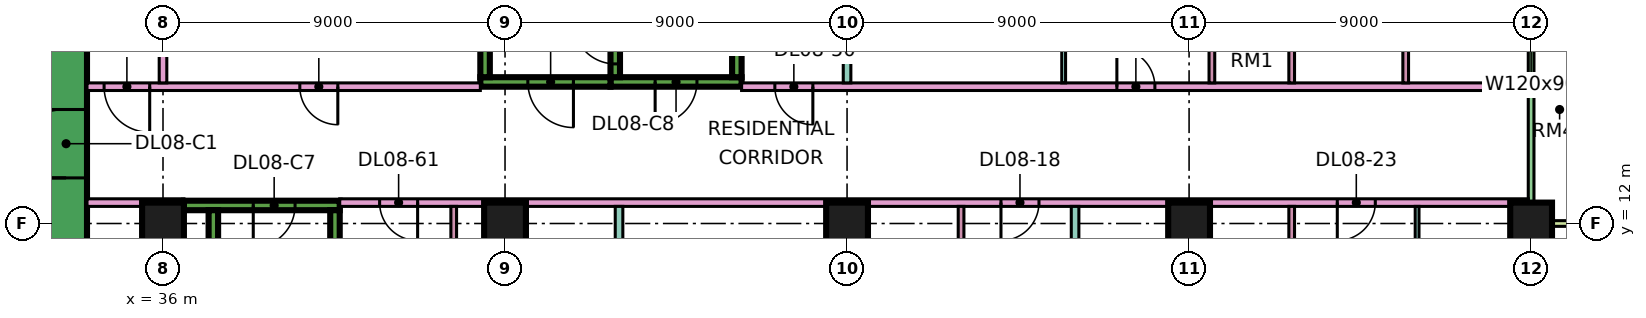
"""IFC4 building model, lengths in metres.
Left out: names, types, materials, properties, quantities, classifications, styles, units other than length and angle.
Written with IfcOpenShell. Run it as: python <this file> out.ifc"""

import sys

from ifc_helpers import new_model, si_unit, direction, frame, frame_2d, origin, origin_2d, place, context, subcontext, project, spatial, rectangle, extrude, element, fill, save


model = new_model("IFC4")
c1 = context("Model", 3, precision=1e-05, world=origin(), true_north=direction((0.0, 1.0)))
c2 = subcontext(c1, "Body", "Model", "MODEL_VIEW")
j1 = project(units=[si_unit("LENGTHUNIT", "METRE"), si_unit("PLANEANGLEUNIT", "RADIAN")], contexts=[c1])
p1 = place(None, origin())
s1 = spatial("IfcSite", under=j1, at=p1, CompositionType="ELEMENT")
p2 = place(p1, origin())
s2 = spatial("IfcBuilding", under=s1, at=p2, CompositionType="ELEMENT")
p3 = place(p2, frame((0.0, 0.0, 45.15)))
s3 = spatial("IfcBuildingStorey", under=s2, at=p3, CompositionType="ELEMENT", Elevation=45.15)
for number, where, z_axis, x_axis in (
    (1, (36.0, 12.0, 0.0), (0.0, 0.0, 1.0), (1.0, 0.0, 0.0)),
    (2, (45.0, 12.0, 0.0), (0.0, 0.0, 1.0), (1.0, 0.0, 0.0)),
    (3, (54.0, 12.0, 0.0), (0.0, 0.0, 1.0), (1.0, 0.0, 0.0)),
    (4, (63.0, 12.0, 0.0), (0.0, 0.0, 1.0), (1.0, 0.0, 0.0)),
    (5, (72.0, 12.0, 0.0), (0.0, 0.0, 1.0), (1.0, 0.0, 0.0)),
):
    element("IfcColumn", number, at=place(p3, frame(where, z_axis=z_axis, x_axis=x_axis)), inside=s3, PredefinedType="COLUMN", context=c2, shape_type="SweptSolid", body=[
        extrude(rectangle(XDim=1.1, YDim=1.1, at=origin_2d()), origin(), (0.0, 0.0, 1.0), 3.75),
    ])
p4 = place(p3, frame((33.45, 8.1, 0.0), z_axis=(0.0, 0.0, 1.0), x_axis=(0.0, 1.0, 0.0)))
e6 = element("IfcWall", 6, at=p4, inside=s3, PredefinedType="SHEAR", context=c2, shape_type="SweptSolid", body=[
    extrude(rectangle(XDim=10.8, YDim=1.1, at=frame_2d((5.4, 0.0))), origin(), (0.0, 0.0, 1.0), 3.75),
])
p5 = place(p4, frame((5.1, 0.0, 0.0)))
e7 = element("IfcOpeningElement", 7, at=p5, cuts=e6, PredefinedType="OPENING", context=c2, shape_type="SweptSolid", body=[
    extrude(rectangle(XDim=1.8, YDim=2.4, at=frame_2d((0.9, 1.2))), frame((0.0, 0.56, 0.0), z_axis=(0.0, -1.0, 0.0), x_axis=(1.0, 0.0, 0.0)), (0.0, 0.0, 1.0), 1.12),
])
p6 = place(p3, frame((36.55, 12.475, 0.0), z_axis=(0.0, 0.0, 1.0), x_axis=(1.0, 0.0, 0.0)))
e8 = element("IfcWall", 8, at=p6, inside=s3, PredefinedType="SHEAR", context=c2, shape_type="SweptSolid", body=[
    extrude(rectangle(XDim=4.1, YDim=0.25, at=frame_2d((2.05, 0.0))), origin(), (0.0, 0.0, 1.0), 3.75),
])
p7 = place(p6, frame((1.825, 0.0, 0.0)))
e9 = element("IfcOpeningElement", 9, at=p7, cuts=e8, PredefinedType="OPENING", context=c2, shape_type="SweptSolid", body=[
    extrude(rectangle(XDim=1.1, YDim=2.2, at=frame_2d((0.55, 1.1))), frame((0.0, 0.135, 0.0), z_axis=(0.0, -1.0, 0.0), x_axis=(1.0, 0.0, 0.0)), (0.0, 0.0, 1.0), 0.27),
])
for number, where, z_axis, x_axis in (
    (10, (37.325, 5.85, 0.0), (0.0, 0.0, 1.0), (0.0, 1.0, 0.0)),
    (11, (40.525, 5.85, 0.0), (0.0, 0.0, 1.0), (0.0, 1.0, 0.0)),
):
    element("IfcWall", number, at=place(p3, frame(where, z_axis=z_axis, x_axis=x_axis)), inside=s3, PredefinedType="SHEAR", context=c2, shape_type="SweptSolid", body=[
        extrude(rectangle(XDim=6.5, YDim=0.25, at=frame_2d((3.25, 0.0))), origin(), (0.0, 0.0, 1.0), 3.75),
    ])
p8 = place(p3, frame((47.775, 15.725, 0.0), z_axis=(0.0, 0.0, 1.0), x_axis=(1.0, 0.0, 0.0)))
e12 = element("IfcWall", 12, at=p8, inside=s3, PredefinedType="SHEAR", context=c2, shape_type="SweptSolid", body=[
    extrude(rectangle(XDim=3.45, YDim=0.25, at=frame_2d((1.725, 0.0))), origin(), (0.0, 0.0, 1.0), 3.75),
])
p9 = place(p8, frame((1.175, 0.0, 0.0)))
e13 = element("IfcOpeningElement", 13, at=p9, cuts=e12, PredefinedType="OPENING", context=c2, shape_type="SweptSolid", body=[
    extrude(rectangle(XDim=1.1, YDim=2.2, at=frame_2d((0.55, 1.1))), frame((0.0, 0.135, 0.0), z_axis=(0.0, -1.0, 0.0), x_axis=(1.0, 0.0, 0.0)), (0.0, 0.0, 1.0), 0.27),
])
p10 = place(p3, frame((47.9, 15.85, 0.0), z_axis=(0.0, 0.0, 1.0), x_axis=(0.0, 1.0, 0.0)))
e14 = element("IfcWall", 14, at=p10, inside=s3, PredefinedType="SHEAR", context=c2, shape_type="SweptSolid", body=[
    extrude(rectangle(XDim=6.5, YDim=0.25, at=frame_2d((3.25, 0.0))), origin(), (0.0, 0.0, 1.0), 3.75),
])
p11 = place(p10, frame((0.35, 0.0, 0.0)))
e15 = element("IfcOpeningElement", 15, at=p11, cuts=e14, PredefinedType="OPENING", context=c2, shape_type="SweptSolid", body=[
    extrude(rectangle(XDim=1.1, YDim=2.2, at=frame_2d((0.55, 1.1))), frame((0.0, 0.135, 0.0), z_axis=(0.0, -1.0, 0.0), x_axis=(1.0, 0.0, 0.0)), (0.0, 0.0, 1.0), 0.27),
])
p12 = place(p3, frame((51.1, 15.85, 0.0), z_axis=(0.0, 0.0, 1.0), x_axis=(0.0, 1.0, 0.0)))
e16 = element("IfcWall", 16, at=p12, inside=s3, PredefinedType="SHEAR", context=c2, shape_type="SweptSolid", body=[
    extrude(rectangle(XDim=6.5, YDim=0.25, at=frame_2d((3.25, 0.0))), origin(), (0.0, 0.0, 1.0), 3.75),
])
p13 = place(p3, frame((44.35, 15.725, 0.0), z_axis=(0.0, 0.0, 1.0), x_axis=(1.0, 0.0, 0.0)))
e17 = element("IfcWall", 17, at=p13, inside=s3, PredefinedType="SHEAR", context=c2, shape_type="SweptSolid", body=[
    extrude(rectangle(XDim=3.425, YDim=0.25, at=frame_2d((1.712, 0.0))), origin(), (0.0, 0.0, 1.0), 3.75),
])
p14 = place(p13, frame((1.25, 0.0, 0.0)))
e18 = element("IfcOpeningElement", 18, at=p14, cuts=e17, PredefinedType="OPENING", context=c2, shape_type="SweptSolid", body=[
    extrude(rectangle(XDim=1.2, YDim=2.2, at=frame_2d((0.6, 1.1))), frame((0.0, 0.135, 0.0), z_axis=(0.0, -1.0, 0.0), x_axis=(1.0, 0.0, 0.0)), (0.0, 0.0, 1.0), 0.27),
])
p15 = place(p3, frame((44.475, 15.85, 0.0), z_axis=(0.0, 0.0, 1.0), x_axis=(0.0, 1.0, 0.0)))
e19 = element("IfcWall", 19, at=p15, inside=s3, PredefinedType="SHEAR", context=c2, shape_type="SweptSolid", body=[
    extrude(rectangle(XDim=6.5, YDim=0.25, at=frame_2d((3.25, 0.0))), origin(), (0.0, 0.0, 1.0), 3.75),
])
p16 = place(p15, frame((1.75, 0.0, 0.0)))
e20 = element("IfcOpeningElement", 20, at=p16, cuts=e19, PredefinedType="OPENING", context=c2, shape_type="SweptSolid", body=[
    extrude(rectangle(XDim=1.1, YDim=2.2, at=frame_2d((0.55, 1.1))), frame((0.0, 0.135, 0.0), z_axis=(0.0, -1.0, 0.0), x_axis=(1.0, 0.0, 0.0)), (0.0, 0.0, 1.0), 0.27),
])
p17 = place(p15, frame((4.3, 0.0, 0.0)))
e21 = element("IfcOpeningElement", 21, at=p17, cuts=e19, PredefinedType="OPENING", context=c2, shape_type="SweptSolid", body=[
    extrude(rectangle(XDim=1.1, YDim=2.2, at=frame_2d((0.55, 1.1))), frame((0.0, 0.135, 0.0), z_axis=(0.0, -1.0, 0.0), x_axis=(1.0, 0.0, 0.0)), (0.0, 0.0, 1.0), 0.27),
])
p18 = place(p3, frame((72.0, 12.075, 0.0), z_axis=(0.0, 0.0, 1.0), x_axis=(0.0, 1.0, 0.0)))
e22 = element("IfcWall", 22, at=p18, inside=s3, PredefinedType="SOLIDWALL", context=c2, shape_type="SweptSolid", body=[
    extrude(rectangle(XDim=10.35, YDim=0.15, at=frame_2d((5.175, 0.0))), origin(), (0.0, 0.0, 1.0), 3.35),
])
p19 = place(p18, frame((4.575, 0.0, 1.7)))
e23 = element("IfcOpeningElement", 23, at=p19, cuts=e22, PredefinedType="OPENING", context=c2, shape_type="SweptSolid", body=[
    extrude(rectangle(XDim=1.2, YDim=0.9, at=frame_2d((0.6, 0.45))), frame((0.0, 0.085, 0.0), z_axis=(0.0, -1.0, 0.0), x_axis=(1.0, 0.0, 0.0)), (0.0, 0.0, 1.0), 0.17),
])
p20 = place(p18, frame((8.587, 0.0, 0.45)))
e24 = element("IfcOpeningElement", 24, at=p20, cuts=e22, PredefinedType="OPENING", context=c2, shape_type="SweptSolid", body=[
    extrude(rectangle(XDim=1.2, YDim=2.4, at=frame_2d((0.6, 1.2))), frame((0.0, 0.085, 0.0), z_axis=(0.0, -1.0, 0.0), x_axis=(1.0, 0.0, 0.0)), (0.0, 0.0, 1.0), 0.17),
])
p21 = place(p3, frame((73.5, 12.0, 0.0), z_axis=(0.0, 0.0, 1.0), x_axis=(-1.0, 0.0, 0.0)))
e25 = element("IfcWall", 25, at=p21, inside=s3, PredefinedType="SOLIDWALL", context=c2, shape_type="SweptSolid", body=[
    extrude(rectangle(XDim=1.5, YDim=0.15, at=frame_2d((0.75, 0.0))), origin(), (0.0, 0.0, 1.0), 3.35),
])
p22 = place(p3, frame((34.0, 12.55, 0.0), z_axis=(0.0, 0.0, 1.0), x_axis=(1.0, 0.0, 0.0)))
e26 = element("IfcWall", 26, at=p22, inside=s3, PredefinedType="PARTITIONING", context=c2, shape_type="SweptSolid", body=[
    extrude(rectangle(XDim=2.551, YDim=0.2, at=frame_2d((1.275, 0.0))), origin(), (0.0, 0.0, 1.0), 3.35),
])
p23 = place(p3, frame((34.0, 15.6, 0.0), z_axis=(0.0, 0.0, 1.0), x_axis=(1.0, 0.0, 0.0)))
e27 = element("IfcWall", 27, at=p23, inside=s3, PredefinedType="PARTITIONING", context=c2, shape_type="SweptSolid", body=[
    extrude(rectangle(XDim=10.35, YDim=0.2, at=frame_2d((5.175, 0.0))), origin(), (0.0, 0.0, 1.0), 3.35),
])
p24 = place(p23, frame((5.6, 0.0, 0.0)))
e28 = element("IfcOpeningElement", 28, at=p24, cuts=e27, PredefinedType="OPENING", context=c2, shape_type="SweptSolid", body=[
    extrude(rectangle(XDim=1.0, YDim=2.1, at=frame_2d((0.5, 1.05))), frame((0.0, 0.11, 0.0), z_axis=(0.0, -1.0, 0.0), x_axis=(1.0, 0.0, 0.0)), (0.0, 0.0, 1.0), 0.22),
])
p25 = place(p23, frame((0.45, 0.0, 0.0)))
e29 = element("IfcOpeningElement", 29, at=p25, cuts=e27, PredefinedType="OPENING", context=c2, shape_type="SweptSolid", body=[
    extrude(rectangle(XDim=1.2, YDim=2.1, at=frame_2d((0.6, 1.05))), frame((0.0, 0.11, 0.0), z_axis=(0.0, -1.0, 0.0), x_axis=(1.0, 0.0, 0.0)), (0.0, 0.0, 1.0), 0.22),
])
p26 = place(p3, frame((36.0, 15.7, 0.0), z_axis=(0.0, 0.0, 1.0), x_axis=(0.0, 1.0, 0.0)))
e30 = element("IfcWall", 30, at=p26, inside=s3, PredefinedType="PARTITIONING", context=c2, shape_type="SweptSolid", body=[
    extrude(rectangle(XDim=8.3, YDim=0.2, at=frame_2d((4.15, 0.0))), origin(), (0.0, 0.0, 1.0), 3.35),
])
p27 = place(p3, frame((40.65, 12.55, 0.0), z_axis=(0.0, 0.0, 1.0), x_axis=(1.0, 0.0, 0.0)))
e31 = element("IfcWall", 31, at=p27, inside=s3, PredefinedType="PARTITIONING", context=c2, shape_type="SweptSolid", body=[
    extrude(rectangle(XDim=31.276, YDim=0.2, at=frame_2d((15.638, 0.0))), origin(), (0.0, 0.0, 1.0), 3.35),
])
p28 = place(p27, frame((17.4, 0.0, 0.0)))
e32 = element("IfcOpeningElement", 32, at=p28, cuts=e31, PredefinedType="OPENING", context=c2, shape_type="SweptSolid", body=[
    extrude(rectangle(XDim=1.0, YDim=2.1, at=frame_2d((0.5, 1.05))), frame((0.0, 0.11, 0.0), z_axis=(0.0, -1.0, 0.0), x_axis=(1.0, 0.0, 0.0)), (0.0, 0.0, 1.0), 0.22),
])
p29 = place(p27, frame((26.25, 0.0, 0.0)))
e33 = element("IfcOpeningElement", 33, at=p29, cuts=e31, PredefinedType="OPENING", context=c2, shape_type="SweptSolid", body=[
    extrude(rectangle(XDim=1.0, YDim=2.1, at=frame_2d((0.5, 1.05))), frame((0.0, 0.11, 0.0), z_axis=(0.0, -1.0, 0.0), x_axis=(1.0, 0.0, 0.0)), (0.0, 0.0, 1.0), 0.22),
])
p30 = place(p27, frame((1.05, 0.0, 0.0)))
e34 = element("IfcOpeningElement", 34, at=p30, cuts=e31, PredefinedType="OPENING", context=c2, shape_type="SweptSolid", body=[
    extrude(rectangle(XDim=1.0, YDim=2.1, at=frame_2d((0.5, 1.05))), frame((0.0, 0.11, 0.0), z_axis=(0.0, -1.0, 0.0), x_axis=(1.0, 0.0, 0.0)), (0.0, 0.0, 1.0), 0.22),
])
p31 = place(p3, frame((43.65, 5.825, 0.0), z_axis=(0.0, 0.0, 1.0), x_axis=(0.0, 1.0, 0.0)))
e35 = element("IfcWall", 35, at=p31, inside=s3, PredefinedType="PARTITIONING", context=c2, shape_type="SweptSolid", body=[
    extrude(rectangle(XDim=6.625, YDim=0.15, at=frame_2d((3.312, 0.0))), origin(), (0.0, 0.0, 1.0), 3.35),
])
p32 = place(p31, frame((4.425, 0.0, 0.0)))
e36 = element("IfcOpeningElement", 36, at=p32, cuts=e35, PredefinedType="OPENING", context=c2, shape_type="SweptSolid", body=[
    extrude(rectangle(XDim=0.9, YDim=2.1, at=frame_2d((0.45, 1.05))), frame((0.0, 0.085, 0.0), z_axis=(0.0, -1.0, 0.0), x_axis=(1.0, 0.0, 0.0)), (0.0, 0.0, 1.0), 0.17),
])
p33 = place(p3, frame((48.0, 0.0, 0.0), z_axis=(0.0, 0.0, 1.0), x_axis=(0.0, 1.0, 0.0)))
e37 = element("IfcWall", 37, at=p33, inside=s3, PredefinedType="PARTITIONING", context=c2, shape_type="SweptSolid", body=[
    extrude(rectangle(XDim=12.45, YDim=0.2, at=frame_2d((6.225, 0.0))), origin(), (0.0, 0.0, 1.0), 3.35),
])
p34 = place(p3, frame((51.225, 15.6, 0.0), z_axis=(0.0, 0.0, 1.0), x_axis=(1.0, 0.0, 0.0)))
e38 = element("IfcWall", 38, at=p34, inside=s3, PredefinedType="PARTITIONING", context=c2, shape_type="SweptSolid", body=[
    extrude(rectangle(XDim=20.701, YDim=0.2, at=frame_2d((10.351, 0.0))), origin(), (0.0, 0.0, 1.0), 3.35),
])
p35 = place(p34, frame((9.875, 0.0, 0.0)))
e39 = element("IfcOpeningElement", 39, at=p35, cuts=e38, PredefinedType="OPENING", context=c2, shape_type="SweptSolid", body=[
    extrude(rectangle(XDim=1.0, YDim=2.1, at=frame_2d((0.5, 1.05))), frame((0.0, 0.11, 0.0), z_axis=(0.0, -1.0, 0.0), x_axis=(1.0, 0.0, 0.0)), (0.0, 0.0, 1.0), 0.22),
])
p36 = place(p34, frame((0.875, 0.0, 0.0)))
e40 = element("IfcOpeningElement", 40, at=p36, cuts=e38, PredefinedType="OPENING", context=c2, shape_type="SweptSolid", body=[
    extrude(rectangle(XDim=1.0, YDim=2.1, at=frame_2d((0.5, 1.05))), frame((0.0, 0.11, 0.0), z_axis=(0.0, -1.0, 0.0), x_axis=(1.0, 0.0, 0.0)), (0.0, 0.0, 1.0), 0.22),
])
p37 = place(p3, frame((54.0, 15.7, 0.0), z_axis=(0.0, 0.0, 1.0), x_axis=(0.0, 1.0, 0.0)))
e41 = element("IfcWall", 41, at=p37, inside=s3, PredefinedType="PARTITIONING", context=c2, shape_type="SweptSolid", body=[
    extrude(rectangle(XDim=8.3, YDim=0.2, at=frame_2d((4.15, 0.0))), origin(), (0.0, 0.0, 1.0), 3.35),
])
p38 = place(p3, frame((54.3, 7.825, 0.0), z_axis=(0.0, 0.0, 1.0), x_axis=(0.0, 1.0, 0.0)))
e42 = element("IfcWall", 42, at=p38, inside=s3, PredefinedType="PARTITIONING", context=c2, shape_type="SweptSolid", body=[
    extrude(rectangle(XDim=4.625, YDim=0.15, at=frame_2d((2.312, 0.0))), origin(), (0.0, 0.0, 1.0), 3.35),
])
p39 = place(p3, frame((57.0, 7.825, 0.0), z_axis=(0.0, 0.0, 1.0), x_axis=(0.0, 1.0, 0.0)))
e43 = element("IfcWall", 43, at=p39, inside=s3, PredefinedType="PARTITIONING", context=c2, shape_type="SweptSolid", body=[
    extrude(rectangle(XDim=4.625, YDim=0.15, at=frame_2d((2.312, 0.0))), origin(), (0.0, 0.0, 1.0), 3.35),
])
p40 = place(p39, frame((1.975, 0.0, 0.0)))
e44 = element("IfcOpeningElement", 44, at=p40, cuts=e43, PredefinedType="OPENING", context=c2, shape_type="SweptSolid", body=[
    extrude(rectangle(XDim=0.8, YDim=2.1, at=frame_2d((0.4, 1.05))), frame((0.0, 0.085, 0.0), z_axis=(0.0, -1.0, 0.0), x_axis=(1.0, 0.0, 0.0)), (0.0, 0.0, 1.0), 0.17),
])
p41 = place(p3, frame((59.7, 15.7, 0.0), z_axis=(0.0, 0.0, 1.0), x_axis=(0.0, 1.0, 0.0)))
e45 = element("IfcWall", 45, at=p41, inside=s3, PredefinedType="PARTITIONING", context=c2, shape_type="SweptSolid", body=[
    extrude(rectangle(XDim=3.15, YDim=0.1, at=frame_2d((1.575, 0.0))), origin(), (0.0, 0.0, 1.0), 3.35),
])
p42 = place(p41, frame((1.1, 0.0, 0.0)))
e46 = element("IfcOpeningElement", 46, at=p42, cuts=e45, PredefinedType="OPENING", context=c2, shape_type="SweptSolid", body=[
    extrude(rectangle(XDim=0.9, YDim=2.1, at=frame_2d((0.45, 1.05))), frame((0.0, 0.06, 0.0), z_axis=(0.0, -1.0, 0.0), x_axis=(1.0, 0.0, 0.0)), (0.0, 0.0, 1.0), 0.12),
])
p43 = place(p3, frame((60.0, 0.0, 0.0), z_axis=(0.0, 0.0, 1.0), x_axis=(0.0, 1.0, 0.0)))
e47 = element("IfcWall", 47, at=p43, inside=s3, PredefinedType="PARTITIONING", context=c2, shape_type="SweptSolid", body=[
    extrude(rectangle(XDim=12.45, YDim=0.2, at=frame_2d((6.225, 0.0))), origin(), (0.0, 0.0, 1.0), 3.35),
])
p44 = place(p3, frame((63.3, 7.225, 0.0), z_axis=(0.0, 0.0, 1.0), x_axis=(0.0, 1.0, 0.0)))
e48 = element("IfcWall", 48, at=p44, inside=s3, PredefinedType="PARTITIONING", context=c2, shape_type="SweptSolid", body=[
    extrude(rectangle(XDim=5.225, YDim=0.15, at=frame_2d((2.612, 0.0))), origin(), (0.0, 0.0, 1.0), 3.35),
])
p45 = place(p3, frame((63.6, 15.7, 0.0), z_axis=(0.0, 0.0, 1.0), x_axis=(0.0, 1.0, 0.0)))
e49 = element("IfcWall", 49, at=p45, inside=s3, PredefinedType="PARTITIONING", context=c2, shape_type="SweptSolid", body=[
    extrude(rectangle(XDim=3.125, YDim=0.15, at=frame_2d((1.562, 0.0))), origin(), (0.0, 0.0, 1.0), 3.35),
])
p46 = place(p45, frame((1.1, 0.0, 0.0)))
e50 = element("IfcOpeningElement", 50, at=p46, cuts=e49, PredefinedType="OPENING", context=c2, shape_type="SweptSolid", body=[
    extrude(rectangle(XDim=0.8, YDim=2.1, at=frame_2d((0.4, 1.05))), frame((0.0, 0.085, 0.0), z_axis=(0.0, -1.0, 0.0), x_axis=(1.0, 0.0, 0.0)), (0.0, 0.0, 1.0), 0.17),
])
p47 = place(p3, frame((65.7, 7.225, 0.0), z_axis=(0.0, 0.0, 1.0), x_axis=(0.0, 1.0, 0.0)))
e51 = element("IfcWall", 51, at=p47, inside=s3, PredefinedType="PARTITIONING", context=c2, shape_type="SweptSolid", body=[
    extrude(rectangle(XDim=5.225, YDim=0.15, at=frame_2d((2.612, 0.0))), origin(), (0.0, 0.0, 1.0), 3.35),
])
p48 = place(p47, frame((2.275, 0.0, 0.0)))
e52 = element("IfcOpeningElement", 52, at=p48, cuts=e51, PredefinedType="OPENING", context=c2, shape_type="SweptSolid", body=[
    extrude(rectangle(XDim=0.8, YDim=2.1, at=frame_2d((0.4, 1.05))), frame((0.0, 0.085, 0.0), z_axis=(0.0, -1.0, 0.0), x_axis=(1.0, 0.0, 0.0)), (0.0, 0.0, 1.0), 0.17),
])
for number, where, z_axis, x_axis in (
    (53, (65.7, 15.7, 0.0), (0.0, 0.0, 1.0), (0.0, 1.0, 0.0)),
    (54, (68.7, 15.7, 0.0), (0.0, 0.0, 1.0), (0.0, 1.0, 0.0)),
):
    element("IfcWall", number, at=place(p3, frame(where, z_axis=z_axis, x_axis=x_axis)), inside=s3, PredefinedType="PARTITIONING", context=c2, shape_type="SweptSolid", body=[
        extrude(rectangle(XDim=3.125, YDim=0.15, at=frame_2d((1.562, 0.0))), origin(), (0.0, 0.0, 1.0), 3.35),
    ])
p49 = place(p3, frame((69.0, 7.1, 0.0), z_axis=(0.0, 0.0, 1.0), x_axis=(0.0, 1.0, 0.0)))
e55 = element("IfcWall", 55, at=p49, inside=s3, PredefinedType="PARTITIONING", context=c2, shape_type="SweptSolid", body=[
    extrude(rectangle(XDim=5.35, YDim=0.1, at=frame_2d((2.675, 0.0))), origin(), (0.0, 0.0, 1.0), 3.35),
])
p50 = place(p5, origin())
e56 = element("IfcDoor", 56, at=p50, inside=s3, OperationType="DOUBLE_DOOR_SINGLE_SWING", PredefinedType="DOOR", context=c2, shape_type="SweptSolid", body=[
    extrude(rectangle(XDim=1.8, YDim=2.4, at=frame_2d((0.9, 1.2))), frame((0.0, 0.025, 0.0), z_axis=(0.0, -1.0, 0.0), x_axis=(1.0, 0.0, 0.0)), (0.0, 0.0, 1.0), 0.05),
])
fill(e7, e56)
p51 = place(p7, frame((1.1, 0.0, 0.0), z_axis=(0.0, 0.0, 1.0), x_axis=(-1.0, 0.0, 0.0)))
e57 = element("IfcDoor", 57, at=p51, inside=s3, OperationType="SINGLE_SWING_LEFT", PredefinedType="DOOR", context=c2, shape_type="SweptSolid", body=[
    extrude(rectangle(XDim=1.1, YDim=2.2, at=frame_2d((0.55, 1.1))), frame((0.0, 0.025, 0.0), z_axis=(0.0, -1.0, 0.0), x_axis=(1.0, 0.0, 0.0)), (0.0, 0.0, 1.0), 0.05),
])
fill(e9, e57)
p52 = place(p9, frame((1.1, 0.0, 0.0), z_axis=(0.0, 0.0, 1.0), x_axis=(-1.0, 0.0, 0.0)))
e58 = element("IfcDoor", 58, at=p52, inside=s3, OperationType="SINGLE_SWING_LEFT", PredefinedType="DOOR", context=c2, shape_type="SweptSolid", body=[
    extrude(rectangle(XDim=1.1, YDim=2.2, at=frame_2d((0.55, 1.1))), frame((0.0, 0.025, 0.0), z_axis=(0.0, -1.0, 0.0), x_axis=(1.0, 0.0, 0.0)), (0.0, 0.0, 1.0), 0.05),
])
fill(e13, e58)
p53 = place(p14, origin())
e59 = element("IfcDoor", 59, at=p53, inside=s3, OperationType="SINGLE_SWING_RIGHT", PredefinedType="DOOR", context=c2, shape_type="SweptSolid", body=[
    extrude(rectangle(XDim=1.2, YDim=2.2, at=frame_2d((0.6, 1.1))), frame((0.0, 0.025, 0.0), z_axis=(0.0, -1.0, 0.0), x_axis=(1.0, 0.0, 0.0)), (0.0, 0.0, 1.0), 0.05),
])
fill(e18, e59)
p54 = place(p11, frame((1.1, 0.0, 0.0), z_axis=(0.0, 0.0, 1.0), x_axis=(-1.0, 0.0, 0.0)))
e60 = element("IfcDoor", 60, at=p54, inside=s3, OperationType="SINGLE_SWING_RIGHT", PredefinedType="DOOR", context=c2, shape_type="SweptSolid", body=[
    extrude(rectangle(XDim=1.1, YDim=2.2, at=frame_2d((0.55, 1.1))), frame((0.0, 0.025, 0.0), z_axis=(0.0, -1.0, 0.0), x_axis=(1.0, 0.0, 0.0)), (0.0, 0.0, 1.0), 0.05),
])
fill(e15, e60)
p55 = place(p24, origin())
e61 = element("IfcDoor", 61, at=p55, inside=s3, OperationType="SINGLE_SWING_RIGHT", PredefinedType="DOOR", context=c2, shape_type="SweptSolid", body=[
    extrude(rectangle(XDim=1.0, YDim=2.1, at=frame_2d((0.5, 1.05))), frame((0.0, 0.025, 0.0), z_axis=(0.0, -1.0, 0.0), x_axis=(1.0, 0.0, 0.0)), (0.0, 0.0, 1.0), 0.05),
])
fill(e28, e61)
p56 = place(p35, origin())
e62 = element("IfcDoor", 62, at=p56, inside=s3, OperationType="SINGLE_SWING_LEFT", PredefinedType="DOOR", context=c2, shape_type="SweptSolid", body=[
    extrude(rectangle(XDim=1.0, YDim=2.1, at=frame_2d((0.5, 1.05))), frame((0.0, 0.025, 0.0), z_axis=(0.0, -1.0, 0.0), x_axis=(1.0, 0.0, 0.0)), (0.0, 0.0, 1.0), 0.05),
])
fill(e39, e62)
p57 = place(p28, frame((1.0, 0.0, 0.0), z_axis=(0.0, 0.0, 1.0), x_axis=(-1.0, 0.0, 0.0)))
e63 = element("IfcDoor", 63, at=p57, inside=s3, OperationType="SINGLE_SWING_LEFT", PredefinedType="DOOR", context=c2, shape_type="SweptSolid", body=[
    extrude(rectangle(XDim=1.0, YDim=2.1, at=frame_2d((0.5, 1.05))), frame((0.0, 0.025, 0.0), z_axis=(0.0, -1.0, 0.0), x_axis=(1.0, 0.0, 0.0)), (0.0, 0.0, 1.0), 0.05),
])
fill(e32, e63)
p58 = place(p29, frame((1.0, 0.0, 0.0), z_axis=(0.0, 0.0, 1.0), x_axis=(-1.0, 0.0, 0.0)))
e64 = element("IfcDoor", 64, at=p58, inside=s3, OperationType="SINGLE_SWING_LEFT", PredefinedType="DOOR", context=c2, shape_type="SweptSolid", body=[
    extrude(rectangle(XDim=1.0, YDim=2.1, at=frame_2d((0.5, 1.05))), frame((0.0, 0.025, 0.0), z_axis=(0.0, -1.0, 0.0), x_axis=(1.0, 0.0, 0.0)), (0.0, 0.0, 1.0), 0.05),
])
fill(e33, e64)
p59 = place(p25, origin())
e65 = element("IfcDoor", 65, at=p59, inside=s3, OperationType="SINGLE_SWING_RIGHT", PredefinedType="DOOR", context=c2, shape_type="SweptSolid", body=[
    extrude(rectangle(XDim=1.2, YDim=2.1, at=frame_2d((0.6, 1.05))), frame((0.0, 0.025, 0.0), z_axis=(0.0, -1.0, 0.0), x_axis=(1.0, 0.0, 0.0)), (0.0, 0.0, 1.0), 0.05),
])
fill(e29, e65)
p60 = place(p36, origin())
e66 = element("IfcDoor", 66, at=p60, inside=s3, OperationType="SINGLE_SWING_RIGHT", PredefinedType="DOOR", context=c2, shape_type="SweptSolid", body=[
    extrude(rectangle(XDim=1.0, YDim=2.1, at=frame_2d((0.5, 1.05))), frame((0.0, 0.025, 0.0), z_axis=(0.0, -1.0, 0.0), x_axis=(1.0, 0.0, 0.0)), (0.0, 0.0, 1.0), 0.05),
])
fill(e40, e66)
p61 = place(p30, origin())
e67 = element("IfcDoor", 67, at=p61, inside=s3, OperationType="SINGLE_SWING_RIGHT", PredefinedType="DOOR", context=c2, shape_type="SweptSolid", body=[
    extrude(rectangle(XDim=1.0, YDim=2.1, at=frame_2d((0.5, 1.05))), frame((0.0, 0.025, 0.0), z_axis=(0.0, -1.0, 0.0), x_axis=(1.0, 0.0, 0.0)), (0.0, 0.0, 1.0), 0.05),
])
fill(e34, e67)
save(model, sys.argv[1])
